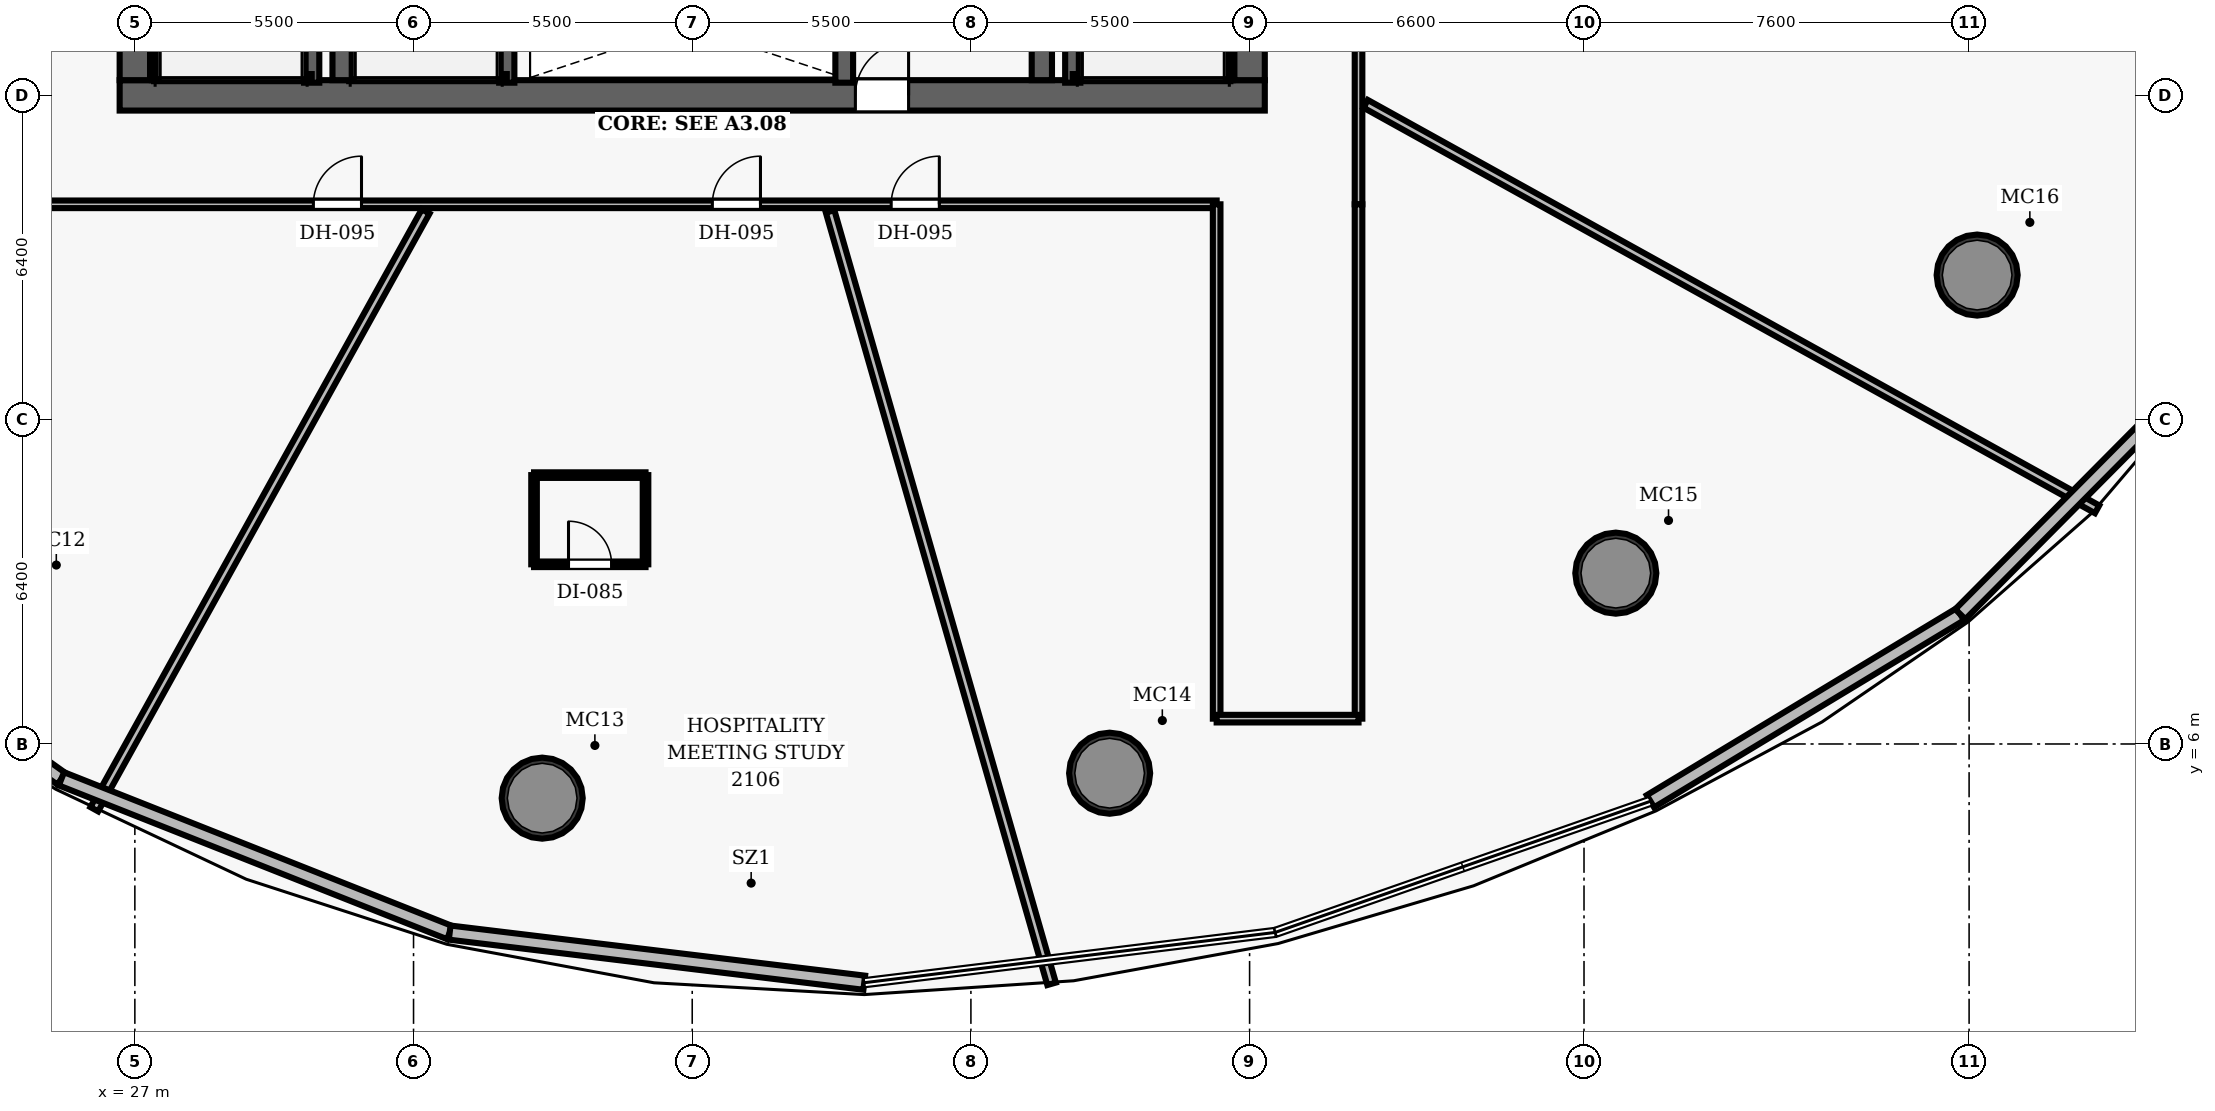
"""IFC4 building model, lengths in metres.
Left out: names, types, materials, properties, quantities, classifications, styles, units other than length and angle.
Written with IfcOpenShell. Run it as: python <this file> out.ifc"""

import sys

from ifc_helpers import new_model, si_unit, direction, frame, frame_2d, origin, origin_2d, place, context, subcontext, project, spatial, rectangle, hollow_circle, extrude, element, fill, save


model = new_model("IFC4")
c1 = context("Model", 3, precision=1e-05, world=origin(), true_north=direction((0.0, 1.0)))
c2 = subcontext(c1, "Body", "Model", "MODEL_VIEW")
j1 = project(units=[si_unit("LENGTHUNIT", "METRE"), si_unit("PLANEANGLEUNIT", "RADIAN")], contexts=[c1])
p1 = place(None, origin())
s1 = spatial("IfcSite", under=j1, at=p1, CompositionType="ELEMENT")
p2 = place(p1, origin())
s2 = spatial("IfcBuilding", under=s1, at=p2, CompositionType="ELEMENT")
p3 = place(p2, frame((0.0, 0.0, 90.4)))
s3 = spatial("IfcBuildingStorey", under=s2, at=p3, CompositionType="ELEMENT", Elevation=90.4)
p4 = place(p3, frame((26.7, 18.8, 0.0), z_axis=(0.0, 0.0, 1.0), x_axis=(1.0, 0.0, 0.0)))
e1 = element("IfcWall", 1, at=p4, inside=s3, PredefinedType="SHEAR", context=c2, shape_type="SweptSolid", body=[
    extrude(rectangle(XDim=22.6, YDim=0.6, at=frame_2d((11.3, 0.0))), origin(), (0.0, 0.0, 1.0), 3.5),
])
p5 = place(p4, frame((14.52, 0.0, 0.0)))
e2 = element("IfcOpeningElement", 2, at=p5, cuts=e1, PredefinedType="OPENING", context=c2, shape_type="SweptSolid", body=[
    extrude(rectangle(XDim=1.05, YDim=2.15, at=frame_2d((0.525, 1.075))), frame((0.0, 0.31, 0.0), z_axis=(0.0, -1.0, 0.0), x_axis=(1.0, 0.0, 0.0)), (0.0, 0.0, 1.0), 0.62),
])
p6 = place(p3, frame((27.0, 19.1, 0.0), z_axis=(0.0, 0.0, 1.0), x_axis=(0.0, 1.0, 0.0)))
e3 = element("IfcWall", 3, at=p6, inside=s3, PredefinedType="SHEAR", context=c2, shape_type="SweptSolid", body=[
    extrude(rectangle(XDim=13.8, YDim=0.6, at=frame_2d((6.9, 0.0))), origin(), (0.0, 0.0, 1.0), 3.5),
])
p7 = place(p6, frame((8.2, 0.0, 0.0)))
e4 = element("IfcOpeningElement", 4, at=p7, cuts=e3, PredefinedType="OPENING", context=c2, shape_type="SweptSolid", body=[
    extrude(rectangle(XDim=1.05, YDim=2.15, at=frame_2d((0.525, 1.075))), frame((0.0, 0.31, 0.0), z_axis=(0.0, -1.0, 0.0), x_axis=(1.0, 0.0, 0.0)), (0.0, 0.0, 1.0), 0.62),
])
p8 = place(p3, frame((49.0, 19.1, 0.0), z_axis=(0.0, 0.0, 1.0), x_axis=(0.0, 1.0, 0.0)))
e5 = element("IfcWall", 5, at=p8, inside=s3, PredefinedType="SHEAR", context=c2, shape_type="SweptSolid", body=[
    extrude(rectangle(XDim=13.8, YDim=0.6, at=frame_2d((6.9, 0.0))), origin(), (0.0, 0.0, 1.0), 3.5),
])
p9 = place(p8, frame((8.2, 0.0, 0.0)))
e6 = element("IfcOpeningElement", 6, at=p9, cuts=e5, PredefinedType="OPENING", context=c2, shape_type="SweptSolid", body=[
    extrude(rectangle(XDim=1.05, YDim=2.15, at=frame_2d((0.525, 1.075))), frame((0.0, 0.31, 0.0), z_axis=(0.0, -1.0, 0.0), x_axis=(1.0, 0.0, 0.0)), (0.0, 0.0, 1.0), 0.62),
])
for number, where, z_axis, x_axis in (
    (7, (31.1, 19.1, 0.0), (0.0, 0.0, 1.0), (0.0, 1.0, 0.0)),
    (8, (44.9, 19.1, 0.0), (0.0, 0.0, 1.0), (0.0, 1.0, 0.0)),
):
    element("IfcWall", number, at=place(p3, frame(where, z_axis=z_axis, x_axis=x_axis)), inside=s3, PredefinedType="SHEAR", context=c2, shape_type="SweptSolid", body=[
        extrude(rectangle(XDim=13.8, YDim=0.4, at=frame_2d((6.9, 0.0))), origin(), (0.0, 0.0, 1.0), 3.5),
    ])
for number, where, z_axis, x_axis in (
    (9, (35.039, 4.931, 0.0), (0.0, 0.0, 1.0), (1.0, 0.0, 0.0)),
    (10, (46.238, 5.423, 0.0), (0.0, 0.0, 1.0), (1.0, 0.0, 0.0)),
    (11, (56.228, 9.371, 0.0), (0.0, 0.0, 1.0), (1.0, 0.0, 0.0)),
    (12, (63.359, 15.254, 0.0), (0.0, 0.0, 1.0), (1.0, 0.0, 0.0)),
):
    element("IfcColumn", number, at=place(p3, frame(where, z_axis=z_axis, x_axis=x_axis)), inside=s3, PredefinedType="COLUMN", context=c2, shape_type="SweptSolid", body=[
        extrude(hollow_circle(Radius=0.8, WallThickness=0.06, at=origin_2d()), origin(), (0.0, 0.0, 1.0), 3.5),
    ])
p10 = place(p3, frame((30.49, 19.05, 0.0), z_axis=(0.0, 0.0, 1.0), x_axis=(0.0, 1.0, 0.0)))
e13 = element("IfcWall", 13, at=p10, inside=s3, PredefinedType="SHEAR", context=c2, shape_type="SweptSolid", body=[
    extrude(rectangle(XDim=7.5, YDim=0.3, at=frame_2d((3.75, 0.0))), origin(), (0.0, 0.0, 1.0), 3.5),
])
p11 = place(p3, frame((27.395, 19.1, 0.0), z_axis=(0.0, 0.0, 1.0), x_axis=(0.0, 1.0, 0.0)))
e14 = element("IfcWall", 14, at=p11, inside=s3, PredefinedType="SHEAR", context=c2, shape_type="SweptSolid", body=[
    extrude(rectangle(XDim=7.45, YDim=0.12, at=frame_2d((3.725, 0.0))), origin(), (0.0, 0.0, 1.0), 3.5),
])
p12 = place(p3, frame((27.395, 19.16, 0.0), z_axis=(0.0, 0.0, 1.0), x_axis=(1.0, 0.0, 0.0)))
e15 = element("IfcWall", 15, at=p12, inside=s3, PredefinedType="SHEAR", context=c2, shape_type="SweptSolid", body=[
    extrude(rectangle(XDim=3.095, YDim=0.12, at=frame_2d((1.547, 0.0))), origin(), (0.0, 0.0, 1.0), 3.5),
])
p13 = place(p3, frame((45.51, 19.05, 0.0), z_axis=(0.0, 0.0, 1.0), x_axis=(0.0, 1.0, 0.0)))
e16 = element("IfcWall", 16, at=p13, inside=s3, PredefinedType="SHEAR", context=c2, shape_type="SweptSolid", body=[
    extrude(rectangle(XDim=7.5, YDim=0.3, at=frame_2d((3.75, 0.0))), origin(), (0.0, 0.0, 1.0), 3.5),
])
p14 = place(p3, frame((48.605, 19.1, 0.0), z_axis=(0.0, 0.0, 1.0), x_axis=(0.0, 1.0, 0.0)))
e17 = element("IfcWall", 17, at=p14, inside=s3, PredefinedType="SHEAR", context=c2, shape_type="SweptSolid", body=[
    extrude(rectangle(XDim=7.45, YDim=0.12, at=frame_2d((3.725, 0.0))), origin(), (0.0, 0.0, 1.0), 3.5),
])
p15 = place(p3, frame((45.51, 19.16, 0.0), z_axis=(0.0, 0.0, 1.0), x_axis=(1.0, 0.0, 0.0)))
e18 = element("IfcWall", 18, at=p15, inside=s3, PredefinedType="SHEAR", context=c2, shape_type="SweptSolid", body=[
    extrude(rectangle(XDim=3.095, YDim=0.12, at=frame_2d((1.547, 0.0))), origin(), (0.0, 0.0, 1.0), 3.5),
])
p16 = place(p3, frame((34.34, 19.05, 0.0), z_axis=(0.0, 0.0, 1.0), x_axis=(0.0, 1.0, 0.0)))
e19 = element("IfcWall", 19, at=p16, inside=s3, PredefinedType="SHEAR", context=c2, shape_type="SweptSolid", body=[
    extrude(rectangle(XDim=7.5, YDim=0.3, at=frame_2d((3.75, 0.0))), origin(), (0.0, 0.0, 1.0), 3.5),
])
p17 = place(p3, frame((31.3, 19.16, 0.0), z_axis=(0.0, 0.0, 1.0), x_axis=(1.0, 0.0, 0.0)))
e20 = element("IfcWall", 20, at=p17, inside=s3, PredefinedType="SHEAR", context=c2, shape_type="SweptSolid", body=[
    extrude(rectangle(XDim=3.04, YDim=0.12, at=frame_2d((1.52, 0.0))), origin(), (0.0, 0.0, 1.0), 3.5),
])
p18 = place(p3, frame((41.0, 19.05, 0.0), z_axis=(0.0, 0.0, 1.0), x_axis=(0.0, 1.0, 0.0)))
e21 = element("IfcWall", 21, at=p18, inside=s3, PredefinedType="SHEAR", context=c2, shape_type="SweptSolid", body=[
    extrude(rectangle(XDim=2.08, YDim=0.35, at=frame_2d((1.04, 0.0))), origin(), (0.0, 0.0, 1.0), 2.6),
])
p19 = place(p3, frame((24.85, 16.65, 0.0), z_axis=(0.0, 0.0, 1.0), x_axis=(1.0, 0.0, 0.0)))
e22 = element("IfcWall", 22, at=p19, inside=s3, PredefinedType="PARTITIONING", context=c2, shape_type="SweptSolid", body=[
    extrude(rectangle(XDim=23.5, YDim=0.15, at=frame_2d((11.75, 0.0))), origin(), (0.0, 0.0, 1.0), 2.6),
])
p20 = place(p19, frame((5.673, 0.0, 0.0)))
e23 = element("IfcOpeningElement", 23, at=p20, cuts=e22, PredefinedType="OPENING", context=c2, shape_type="SweptSolid", body=[
    extrude(rectangle(XDim=0.95, YDim=2.15, at=frame_2d((0.475, 1.075))), frame((0.0, 0.085, 0.0), z_axis=(0.0, -1.0, 0.0), x_axis=(1.0, 0.0, 0.0)), (0.0, 0.0, 1.0), 0.17),
])
p21 = place(p19, frame((13.547, 0.0, 0.0)))
e24 = element("IfcOpeningElement", 24, at=p21, cuts=e22, PredefinedType="OPENING", context=c2, shape_type="SweptSolid", body=[
    extrude(rectangle(XDim=0.95, YDim=2.15, at=frame_2d((0.475, 1.075))), frame((0.0, 0.085, 0.0), z_axis=(0.0, -1.0, 0.0), x_axis=(1.0, 0.0, 0.0)), (0.0, 0.0, 1.0), 0.17),
])
p22 = place(p19, frame((17.077, 0.0, 0.0)))
e25 = element("IfcOpeningElement", 25, at=p22, cuts=e22, PredefinedType="OPENING", context=c2, shape_type="SweptSolid", body=[
    extrude(rectangle(XDim=0.95, YDim=2.15, at=frame_2d((0.475, 1.075))), frame((0.0, 0.085, 0.0), z_axis=(0.0, -1.0, 0.0), x_axis=(1.0, 0.0, 0.0)), (0.0, 0.0, 1.0), 0.17),
])
p23 = place(p3, frame((51.15, 16.65, 0.0), z_axis=(0.0, 0.0, 1.0), x_axis=(0.0, 1.0, 0.0)))
e26 = element("IfcWall", 26, at=p23, inside=s3, PredefinedType="PARTITIONING", context=c2, shape_type="SweptSolid", body=[
    extrude(rectangle(XDim=15.9, YDim=0.15, at=frame_2d((7.95, 0.0))), origin(), (0.0, 0.0, 1.0), 2.6),
])
p24 = place(p23, frame((7.098, 0.0, 0.0)))
e27 = element("IfcOpeningElement", 27, at=p24, cuts=e26, PredefinedType="OPENING", context=c2, shape_type="SweptSolid", body=[
    extrude(rectangle(XDim=0.95, YDim=2.15, at=frame_2d((0.475, 1.075))), frame((0.0, 0.085, 0.0), z_axis=(0.0, -1.0, 0.0), x_axis=(1.0, 0.0, 0.0)), (0.0, 0.0, 1.0), 0.17),
])
for number, where, z_axis, x_axis in (
    (28, (48.35, 6.5, 0.0), (0.0, 0.0, 1.0), (0.0, 1.0, 0.0)),
    (29, (51.15, 6.5, 0.0), (0.0, 0.0, 1.0), (0.0, 1.0, 0.0)),
):
    element("IfcWall", number, at=place(p3, frame(where, z_axis=z_axis, x_axis=x_axis)), inside=s3, PredefinedType="PARTITIONING", context=c2, shape_type="SweptSolid", body=[
        extrude(rectangle(XDim=10.15, YDim=0.15, at=frame_2d((5.075, 0.0))), origin(), (0.0, 0.0, 1.0), 2.6),
    ])
p25 = place(p3, frame((48.35, 6.5, 0.0), z_axis=(0.0, 0.0, 1.0), x_axis=(1.0, 0.0, 0.0)))
e30 = element("IfcWall", 30, at=p25, inside=s3, PredefinedType="PARTITIONING", context=c2, shape_type="SweptSolid", body=[
    extrude(rectangle(XDim=2.8, YDim=0.15, at=frame_2d((1.4, 0.0))), origin(), (0.0, 0.0, 1.0), 2.6),
])
p26 = place(p3, frame((32.74, 16.51, 0.0), z_axis=(0.0, 0.0, 1.0), x_axis=(-0.484803658496, -0.874623011765, 0.0)))
e31 = element("IfcWall", 31, at=p26, inside=s3, PredefinedType="PARTITIONING", context=c2, shape_type="SweptSolid", body=[
    extrude(rectangle(XDim=13.489, YDim=0.175, at=frame_2d((6.745, 0.0))), origin(), (0.0, 0.0, 1.0), 2.6),
])
p27 = place(p3, frame((40.721, 16.51, 0.0), z_axis=(0.0, 0.0, 1.0), x_axis=(0.275634013996, -0.961262654184, 0.0)))
e32 = element("IfcWall", 32, at=p27, inside=s3, PredefinedType="PARTITIONING", context=c2, shape_type="SweptSolid", body=[
    extrude(rectangle(XDim=15.857, YDim=0.175, at=frame_2d((7.929, 0.0))), origin(), (0.0, 0.0, 1.0), 2.6),
])
p28 = place(p3, frame((51.29, 18.633, 0.0), z_axis=(0.0, 0.0, 1.0), x_axis=(0.874615280468, -0.484817606087, 0.0)))
e33 = element("IfcWall", 33, at=p28, inside=s3, PredefinedType="PARTITIONING", context=c2, shape_type="SweptSolid", body=[
    extrude(rectangle(XDim=16.506, YDim=0.175, at=frame_2d((8.253, 0.0))), origin(), (0.0, 0.0, 1.0), 2.6),
])
p29 = place(p3, frame((34.878, 9.546, 0.0), z_axis=(0.0, 0.0, 1.0), x_axis=(1.0, 0.0, 0.0)))
e34 = element("IfcWall", 34, at=p29, inside=s3, PredefinedType="PARTITIONING", context=c2, shape_type="SweptSolid", body=[
    extrude(rectangle(XDim=2.2, YDim=0.11, at=frame_2d((1.1, 0.0))), origin(), (0.0, 0.0, 1.0), 2.6),
])
p30 = place(p29, frame((0.68, 0.0, 0.0)))
e35 = element("IfcOpeningElement", 35, at=p30, cuts=e34, PredefinedType="OPENING", context=c2, shape_type="SweptSolid", body=[
    extrude(rectangle(XDim=0.85, YDim=2.1, at=frame_2d((0.425, 1.05))), frame((0.0, 0.065, 0.0), z_axis=(0.0, -1.0, 0.0), x_axis=(1.0, 0.0, 0.0)), (0.0, 0.0, 1.0), 0.13),
])
p31 = place(p3, frame((34.878, 11.306, 0.0), z_axis=(0.0, 0.0, 1.0), x_axis=(1.0, 0.0, 0.0)))
e36 = element("IfcWall", 36, at=p31, inside=s3, PredefinedType="PARTITIONING", context=c2, shape_type="SweptSolid", body=[
    extrude(rectangle(XDim=2.2, YDim=0.11, at=frame_2d((1.1, 0.0))), origin(), (0.0, 0.0, 1.0), 2.6),
])
for number, where, z_axis, x_axis in (
    (37, (34.878, 9.546, 0.0), (0.0, 0.0, 1.0), (0.0, 1.0, 0.0)),
    (38, (37.078, 9.546, 0.0), (0.0, 0.0, 1.0), (0.0, 1.0, 0.0)),
):
    element("IfcWall", number, at=place(p3, frame(where, z_axis=z_axis, x_axis=x_axis)), inside=s3, PredefinedType="PARTITIONING", context=c2, shape_type="SweptSolid", body=[
        extrude(rectangle(XDim=1.76, YDim=0.11, at=frame_2d((0.88, 0.0))), origin(), (0.0, 0.0, 1.0), 2.6),
    ])
p32 = place(p3, frame((25.551, 5.313, 0.0), z_axis=(0.0, 0.0, 1.0), x_axis=(-0.814366918051, 0.580350344865, 0.0)))
e39 = element("IfcWall", 39, at=p32, inside=s3, PredefinedType="SOLIDWALL", context=c2, shape_type="SweptSolid", body=[
    extrude(rectangle(XDim=8.171, YDim=0.28, at=frame_2d((4.085, 0.0))), origin(), (0.0, 0.0, 1.0), 3.25),
])
p33 = place(p3, frame((33.213, 2.278, 0.0), z_axis=(0.0, 0.0, 1.0), x_axis=(-0.929723797597, 0.368257600304, 0.0)))
e40 = element("IfcWall", 40, at=p33, inside=s3, PredefinedType="SOLIDWALL", context=c2, shape_type="SweptSolid", body=[
    extrude(rectangle(XDim=8.241, YDim=0.28, at=frame_2d((4.121, 0.0))), origin(), (0.0, 0.0, 1.0), 3.25),
])
p34 = place(p3, frame((41.395, 1.289, 0.0), z_axis=(0.0, 0.0, 1.0), x_axis=(-0.992773297887, 0.120004912414, 0.0)))
e41 = element("IfcWall", 41, at=p34, inside=s3, PredefinedType="SOLIDWALL", context=c2, shape_type="SweptSolid", body=[
    extrude(rectangle(XDim=8.241, YDim=0.28, at=frame_2d((4.121, 0.0))), origin(), (0.0, 0.0, 1.0), 3.25),
])
p35 = place(p3, frame((63.026, 8.561, 0.0), z_axis=(0.0, 0.0, 1.0), x_axis=(-0.856154031239, -0.516720693212, 0.0)))
e42 = element("IfcWall", 42, at=p35, inside=s3, PredefinedType="SOLIDWALL", context=c2, shape_type="SweptSolid", body=[
    extrude(rectangle(XDim=7.143, YDim=0.28, at=frame_2d((3.572, 0.0))), origin(), (0.0, 0.0, 1.0), 3.25),
])
p36 = place(p3, frame((67.401, 12.971, 0.0), z_axis=(0.0, 0.0, 1.0), x_axis=(-0.704291107344, -0.709911287497, 0.0)))
e43 = element("IfcWall", 43, at=p36, inside=s3, PredefinedType="SOLIDWALL", context=c2, shape_type="SweptSolid", body=[
    extrude(rectangle(XDim=6.212, YDim=0.28, at=frame_2d((3.106, 0.0))), origin(), (0.0, 0.0, 1.0), 3.25),
])
p37 = place(p5, origin())
e44 = element("IfcDoor", 44, at=p37, inside=s3, OperationType="SINGLE_SWING_RIGHT", PredefinedType="DOOR", context=c2, shape_type="SweptSolid", body=[
    extrude(rectangle(XDim=1.05, YDim=2.15, at=frame_2d((0.525, 1.075))), frame((0.0, 0.025, 0.0), z_axis=(0.0, -1.0, 0.0), x_axis=(1.0, 0.0, 0.0)), (0.0, 0.0, 1.0), 0.05),
])
fill(e2, e44)
p38 = place(p20, origin())
e45 = element("IfcDoor", 45, at=p38, inside=s3, OperationType="SINGLE_SWING_RIGHT", PredefinedType="DOOR", context=c2, shape_type="SweptSolid", body=[
    extrude(rectangle(XDim=0.95, YDim=2.15, at=frame_2d((0.475, 1.075))), frame((0.0, 0.025, 0.0), z_axis=(0.0, -1.0, 0.0), x_axis=(1.0, 0.0, 0.0)), (0.0, 0.0, 1.0), 0.05),
])
fill(e23, e45)
p39 = place(p21, origin())
e46 = element("IfcDoor", 46, at=p39, inside=s3, OperationType="SINGLE_SWING_RIGHT", PredefinedType="DOOR", context=c2, shape_type="SweptSolid", body=[
    extrude(rectangle(XDim=0.95, YDim=2.15, at=frame_2d((0.475, 1.075))), frame((0.0, 0.025, 0.0), z_axis=(0.0, -1.0, 0.0), x_axis=(1.0, 0.0, 0.0)), (0.0, 0.0, 1.0), 0.05),
])
fill(e24, e46)
p40 = place(p30, origin())
e47 = element("IfcDoor", 47, at=p40, inside=s3, OperationType="SINGLE_SWING_LEFT", PredefinedType="DOOR", context=c2, shape_type="SweptSolid", body=[
    extrude(rectangle(XDim=0.85, YDim=2.1, at=frame_2d((0.425, 1.05))), frame((0.0, 0.025, 0.0), z_axis=(0.0, -1.0, 0.0), x_axis=(1.0, 0.0, 0.0)), (0.0, 0.0, 1.0), 0.05),
])
fill(e35, e47)
p41 = place(p22, origin())
e48 = element("IfcDoor", 48, at=p41, inside=s3, OperationType="SINGLE_SWING_RIGHT", PredefinedType="DOOR", context=c2, shape_type="SweptSolid", body=[
    extrude(rectangle(XDim=0.95, YDim=2.15, at=frame_2d((0.475, 1.075))), frame((0.0, 0.025, 0.0), z_axis=(0.0, -1.0, 0.0), x_axis=(1.0, 0.0, 0.0)), (0.0, 0.0, 1.0), 0.05),
])
fill(e25, e48)
save(model, sys.argv[1])
